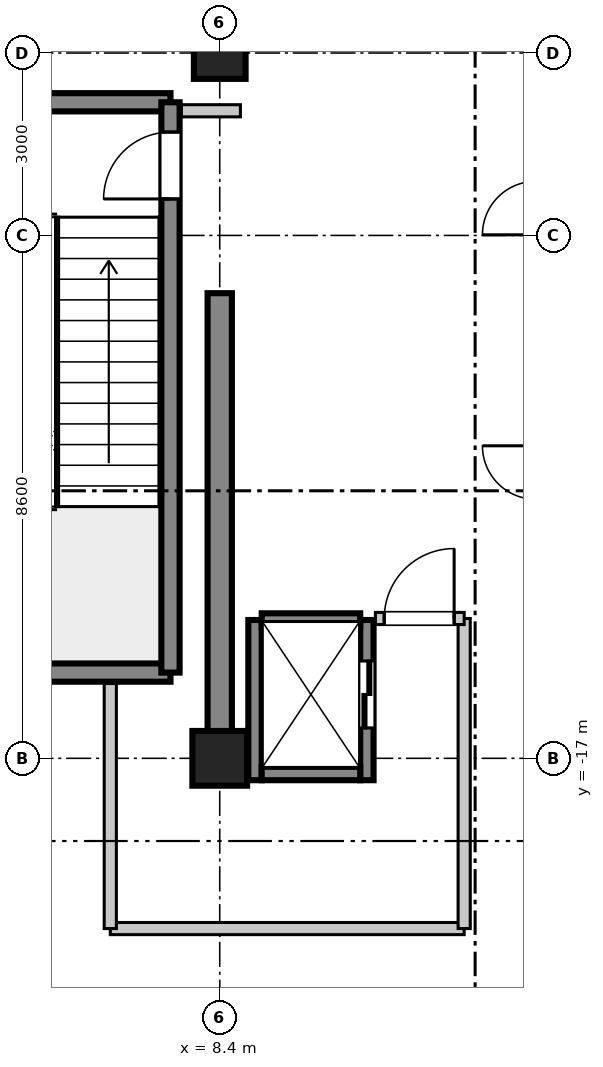
"""IFC4 building model, lengths in metres.
Left out: names, types, materials, properties, quantities, classifications, styles, units other than length and angle.
Written with IfcOpenShell. Run it as: python <this file> out.ifc"""

import sys

from ifc_helpers import new_model, si_unit, direction, frame, frame_2d, origin, origin_2d, place, context, subcontext, project, spatial, rectangle, extrude, source, transform, mapped, element, fill, save


model = new_model("IFC4")
c1 = context("Model", 3, precision=1e-05, world=origin(), true_north=direction((0.0, 1.0)))
c2 = subcontext(c1, "Body", "Model", "MODEL_VIEW")
j1 = project(units=[si_unit("LENGTHUNIT", "METRE"), si_unit("PLANEANGLEUNIT", "RADIAN")], contexts=[c1])
p1 = place(None, origin())
s1 = spatial("IfcSite", under=j1, at=p1, CompositionType="ELEMENT")
p2 = place(p1, origin())
s2 = spatial("IfcBuilding", under=s1, at=p2, CompositionType="ELEMENT")
p3 = place(p2, frame((0.0, 0.0, 352.05)))
s3 = spatial("IfcBuildingStorey", under=s2, at=p3, CompositionType="ELEMENT", Elevation=352.05)
m1 = source(origin(), c2, "Body", "SweptSolid", [
    extrude(rectangle(XDim=0.9, YDim=0.9, at=origin_2d()), origin(), (0.0, 0.0, 1.0), 4.955),
])
p4 = place(p3, frame((8.4, -17.0, 0.0), z_axis=(0.0, 0.0, 1.0), x_axis=(1.0, 0.0, 0.0)))
e1 = element("IfcColumn", 1, at=p4, inside=s3, PredefinedType="COLUMN", context=c2, shape_type="MappedRepresentation", body=[
    mapped(m1, transform((0.0, 0.0, 0.0), scale=1.0)),
])
m2 = source(origin(), c2, "Body", "SweptSolid", [
    extrude(rectangle(XDim=0.85, YDim=0.85, at=origin_2d()), origin(), (0.0, 0.0, 1.0), 4.955),
])
p5 = place(p3, frame((8.4, -5.4, 0.0), z_axis=(0.0, 0.0, 1.0), x_axis=(1.0, 0.0, 0.0)))
e2 = element("IfcColumn", 2, at=p5, inside=s3, PredefinedType="PILASTER", context=c2, shape_type="MappedRepresentation", body=[
    mapped(m2, transform((0.0, 0.0, 0.0), scale=1.0)),
])
m3 = source(origin(), c2, "Body", "SweptSolid", [
    extrude(rectangle(XDim=7.65, YDim=0.4, at=frame_2d((3.825, 0.0))), origin(), (0.0, 0.0, 1.0), 4.7),
])
p6 = place(p3, frame((8.4, -17.0, 0.0), z_axis=(0.0, 0.0, 1.0), x_axis=(0.0, 1.0, 0.0)))
e3 = element("IfcWall", 3, at=p6, inside=s3, PredefinedType="SHEAR", context=c2, shape_type="MappedRepresentation", body=[
    mapped(m3, transform((0.0, 0.0, 0.0), scale=1.0)),
])
m4 = source(origin(), c2, "Body", "SweptSolid", [
    extrude(rectangle(XDim=3.98, YDim=0.3, at=frame_2d((1.99, 0.0))), origin(), (0.0, 0.0, 1.0), 4.7),
])
for number, where, z_axis, x_axis in (
    (4, (3.61, -15.59, 0.0), (0.0, 0.0, 1.0), (1.0, 0.0, 0.0)),
    (5, (3.61, -6.21, 0.0), (0.0, 0.0, 1.0), (1.0, 0.0, 0.0)),
):
    element("IfcWall", number, at=place(p3, frame(where, z_axis=z_axis, x_axis=x_axis)), inside=s3, PredefinedType="SHEAR", context=c2, shape_type="MappedRepresentation", body=[
        mapped(m4, transform((0.0, 0.0, 0.0), scale=1.0)),
    ])
m5 = source(origin(), c2, "Body", "SweptSolid", [
    extrude(rectangle(XDim=9.38, YDim=0.3, at=frame_2d((4.69, 0.0))), origin(), (0.0, 0.0, 1.0), 4.7),
])
p7 = place(p3, frame((7.59, -15.59, 0.0), z_axis=(0.0, 0.0, 1.0), x_axis=(0.0, 1.0, 0.0)))
e6 = element("IfcWall", 6, at=p7, inside=s3, PredefinedType="SHEAR", context=c2, shape_type="MappedRepresentation", body=[
    mapped(m5, transform((0.0, 0.0, 0.0), scale=1.0)),
])
p8 = place(p7, frame((7.79, 0.0, 0.0)))
e7 = element("IfcOpeningElement", 7, at=p8, cuts=e6, PredefinedType="OPENING", context=c2, shape_type="SweptSolid", body=[
    extrude(rectangle(XDim=1.1, YDim=2.15, at=frame_2d((0.55, 1.075))), frame((0.0, 0.16, 0.0), z_axis=(0.0, -1.0, 0.0), x_axis=(1.0, 0.0, 0.0)), (0.0, 0.0, 1.0), 0.32),
])
m6 = source(origin(), c2, "Body", "SweptSolid", [
    extrude(rectangle(XDim=2.635, YDim=0.22, at=frame_2d((1.317, 0.0))), origin(), (0.0, 0.0, 1.0), 4.7),
])
p9 = place(p3, frame((8.98, -17.36, 0.0), z_axis=(0.0, 0.0, 1.0), x_axis=(0.0, 1.0, 0.0)))
e8 = element("IfcWall", 8, at=p9, inside=s3, PredefinedType="SHEAR", context=c2, shape_type="MappedRepresentation", body=[
    mapped(m6, transform((0.0, 0.0, 0.0), scale=1.0)),
])
p10 = place(p3, frame((10.82, -17.36, 0.0), z_axis=(0.0, 0.0, 1.0), x_axis=(0.0, 1.0, 0.0)))
e9 = element("IfcWall", 9, at=p10, inside=s3, PredefinedType="SHEAR", context=c2, shape_type="MappedRepresentation", body=[
    mapped(m6, transform((0.0, 0.0, 0.0), scale=1.0)),
])
p11 = place(p10, frame((0.86, 0.0, 0.0)))
e10 = element("IfcOpeningElement", 10, at=p11, cuts=e9, PredefinedType="OPENING", context=c2, shape_type="SweptSolid", body=[
    extrude(rectangle(XDim=1.1, YDim=2.2, at=frame_2d((0.55, 1.1))), frame((0.0, 0.12, 0.0), z_axis=(0.0, -1.0, 0.0), x_axis=(1.0, 0.0, 0.0)), (0.0, 0.0, 1.0), 0.24),
])
m7 = source(origin(), c2, "Body", "SweptSolid", [
    extrude(rectangle(XDim=1.62, YDim=0.22, at=frame_2d((0.81, 0.0))), origin(), (0.0, 0.0, 1.0), 4.7),
])
p12 = place(p3, frame((9.09, -17.25, 0.0), z_axis=(0.0, 0.0, 1.0), x_axis=(1.0, 0.0, 0.0)))
e11 = element("IfcWall", 11, at=p12, inside=s3, PredefinedType="SHEAR", context=c2, shape_type="MappedRepresentation", body=[
    mapped(m7, transform((0.0, 0.0, 0.0), scale=1.0)),
])
m8 = source(origin(), c2, "Body", "SweptSolid", [
    extrude(rectangle(XDim=1.62, YDim=0.22, at=frame_2d((0.81, 0.0))), origin(), (0.0, 0.0, 1.0), 5.0),
])
p13 = place(p3, frame((9.09, -14.725, 0.0), z_axis=(0.0, 0.0, 1.0), x_axis=(1.0, 0.0, 0.0)))
e12 = element("IfcWall", 12, at=p13, inside=s3, PredefinedType="SHEAR", context=c2, shape_type="MappedRepresentation", body=[
    mapped(m8, transform((0.0, 0.0, 0.0), scale=1.0)),
])
m9 = source(origin(), c2, "Body", "SweptSolid", [
    extrude(rectangle(XDim=5.82, YDim=0.2, at=frame_2d((2.91, 0.0))), origin(), (0.0, 0.0, 1.0), 3.4),
])
p14 = place(p3, frame((6.6, -19.8, 0.0), z_axis=(0.0, 0.0, 1.0), x_axis=(1.0, 0.0, 0.0)))
e13 = element("IfcWall", 13, at=p14, inside=s3, PredefinedType="PARTITIONING", context=c2, shape_type="MappedRepresentation", body=[
    mapped(m9, transform((0.0, 0.0, 0.0), scale=1.0)),
])
m10 = source(origin(), c2, "Body", "SweptSolid", [
    extrude(rectangle(XDim=4.03, YDim=0.2, at=frame_2d((2.015, 0.0))), origin(), (0.0, 0.0, 1.0), 3.4),
])
p15 = place(p3, frame((6.6, -19.8, 0.0), z_axis=(0.0, 0.0, 1.0), x_axis=(0.0, 1.0, 0.0)))
e14 = element("IfcWall", 14, at=p15, inside=s3, PredefinedType="PARTITIONING", context=c2, shape_type="MappedRepresentation", body=[
    mapped(m10, transform((0.0, 0.0, 0.0), scale=1.0)),
])
m11 = source(origin(), c2, "Body", "SweptSolid", [
    extrude(rectangle(XDim=5.1, YDim=0.2, at=frame_2d((2.55, 0.0))), origin(), (0.0, 0.0, 1.0), 3.4),
])
p16 = place(p3, frame((12.42, -19.8, 0.0), z_axis=(0.0, 0.0, 1.0), x_axis=(0.0, 1.0, 0.0)))
e15 = element("IfcWall", 15, at=p16, inside=s3, PredefinedType="PARTITIONING", context=c2, shape_type="MappedRepresentation", body=[
    mapped(m11, transform((0.0, 0.0, 0.0), scale=1.0)),
])
m12 = source(origin(), c2, "Body", "SweptSolid", [
    extrude(rectangle(XDim=1.46, YDim=0.2, at=frame_2d((0.73, 0.0))), origin(), (0.0, 0.0, 1.0), 3.4),
])
p17 = place(p3, frame((10.96, -14.7, 0.0), z_axis=(0.0, 0.0, 1.0), x_axis=(1.0, 0.0, 0.0)))
e16 = element("IfcWall", 16, at=p17, inside=s3, PredefinedType="PARTITIONING", context=c2, shape_type="MappedRepresentation", body=[
    mapped(m12, transform((0.0, 0.0, 0.0), scale=1.0)),
])
p18 = place(p17, frame((0.145, 0.0, 0.0)))
e17 = element("IfcOpeningElement", 17, at=p18, cuts=e16, PredefinedType="OPENING", context=c2, shape_type="SweptSolid", body=[
    extrude(rectangle(XDim=1.15, YDim=2.15, at=frame_2d((0.575, 1.075))), frame((0.0, 0.11, 0.0), z_axis=(0.0, -1.0, 0.0), x_axis=(1.0, 0.0, 0.0)), (0.0, 0.0, 1.0), 0.22),
])
m13 = source(origin(), c2, "Body", "SweptSolid", [
    extrude(rectangle(XDim=0.97, YDim=0.2, at=frame_2d((0.485, 0.0))), origin(), (0.0, 0.0, 1.0), 3.4),
])
p19 = place(p3, frame((7.77, -6.35, 0.0), z_axis=(0.0, 0.0, 1.0), x_axis=(1.0, 0.0, 0.0)))
e18 = element("IfcWall", 18, at=p19, inside=s3, PredefinedType="PARTITIONING", context=c2, shape_type="MappedRepresentation", body=[
    mapped(m13, transform((0.0, 0.0, 0.0), scale=1.0)),
])
m14 = source(origin(), c2, "Body", "SweptSolid", [
    extrude(rectangle(XDim=1.1, YDim=2.15, at=frame_2d((0.55, 1.075))), frame((0.0, 0.025, 0.0), z_axis=(0.0, -1.0, 0.0), x_axis=(1.0, 0.0, 0.0)), (0.0, 0.0, 1.0), 0.05),
])
p20 = place(p8, origin())
e19 = element("IfcDoor", 19, at=p20, inside=s3, OperationType="SINGLE_SWING_LEFT", PredefinedType="DOOR", context=c2, shape_type="MappedRepresentation", body=[
    mapped(m14, transform((0.0, 0.0, 0.0), scale=1.0)),
])
fill(e7, e19)
m15 = source(origin(), c2, "Body", "SweptSolid", [
    extrude(rectangle(XDim=1.1, YDim=2.2, at=frame_2d((0.55, 1.1))), frame((0.0, 0.025, 0.0), z_axis=(0.0, -1.0, 0.0), x_axis=(1.0, 0.0, 0.0)), (0.0, 0.0, 1.0), 0.05),
])
p21 = place(p11, frame((1.1, 0.0, 0.0), z_axis=(0.0, 0.0, 1.0), x_axis=(-1.0, 0.0, 0.0)))
e20 = element("IfcDoor", 20, at=p21, inside=s3, OperationType="DOUBLE_DOOR_SLIDING", PredefinedType="DOOR", context=c2, shape_type="MappedRepresentation", body=[
    mapped(m15, transform((0.0, 0.0, 0.0), scale=1.0)),
])
fill(e10, e20)
m16 = source(origin(), c2, "Body", "SweptSolid", [
    extrude(rectangle(XDim=1.15, YDim=2.15, at=frame_2d((0.575, 1.075))), frame((0.0, 0.025, 0.0), z_axis=(0.0, -1.0, 0.0), x_axis=(1.0, 0.0, 0.0)), (0.0, 0.0, 1.0), 0.05),
])
p22 = place(p18, origin())
e21 = element("IfcDoor", 21, at=p22, inside=s3, OperationType="SINGLE_SWING_RIGHT", PredefinedType="DOOR", context=c2, shape_type="MappedRepresentation", body=[
    mapped(m16, transform((0.0, 0.0, 0.0), scale=1.0)),
])
fill(e17, e21)
save(model, sys.argv[1])
